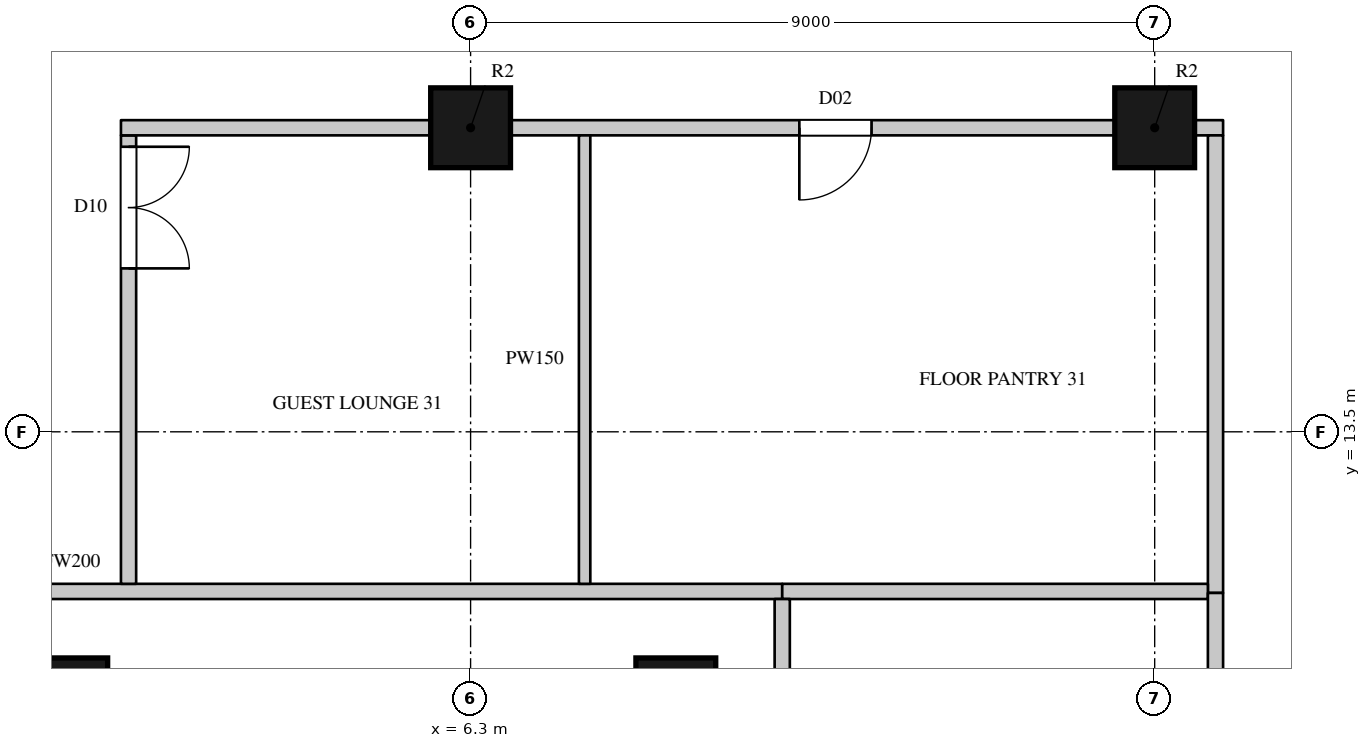
"""IFC4 building model, lengths in metres.
Left out: names, types, materials, properties, quantities, classifications, styles, units other than length and angle.
Written with IfcOpenShell. Run it as: python <this file> out.ifc"""

import sys

from ifc_helpers import new_model, si_unit, direction, frame, frame_2d, origin, origin_2d, place, context, subcontext, project, spatial, rectangle, circle, extrude, element, fill, save


model = new_model("IFC4")
c1 = context("Model", 3, precision=1e-05, world=origin(), true_north=direction((0.0, 1.0)))
c2 = subcontext(c1, "Body", "Model", "MODEL_VIEW")
j1 = project(units=[si_unit("LENGTHUNIT", "METRE"), si_unit("PLANEANGLEUNIT", "RADIAN")], contexts=[c1])
p1 = place(None, origin())
s1 = spatial("IfcSite", under=j1, at=p1, CompositionType="ELEMENT")
p2 = place(p1, origin())
s2 = spatial("IfcBuilding", under=s1, at=p2, CompositionType="ELEMENT")
p3 = place(p2, frame((0.0, 0.0, 141.9)))
s3 = spatial("IfcBuildingStorey", under=s2, at=p3, CompositionType="ELEMENT", Elevation=141.9)
for number, where, z_axis, x_axis in (
    (1, (6.3, 17.5, 0.0), (0.0, 0.0, 1.0), (1.0, 0.0, 0.0)),
    (2, (15.3, 17.5, 0.0), (0.0, 0.0, 1.0), (1.0, 0.0, 0.0)),
    (3, (1.0, 10.0, 0.0), (0.0, 0.0, 1.0), (1.0, 0.0, 0.0)),
    (4, (9.0, 10.0, 0.0), (0.0, 0.0, 1.0), (1.0, 0.0, 0.0)),
):
    element("IfcColumn", number, at=place(p3, frame(where, z_axis=z_axis, x_axis=x_axis)), inside=s3, PredefinedType="COLUMN", context=c2, shape_type="SweptSolid", body=[
        extrude(circle(Radius=0.525, at=origin_2d()), origin(), (0.0, 0.0, 1.0), 3.6),
    ])
p4 = place(p3, frame((-8.3, 11.4, 0.0), z_axis=(0.0, 0.0, 1.0), x_axis=(1.0, 0.0, 0.0)))
e5 = element("IfcWall", 5, at=p4, inside=s3, PredefinedType="PARTITIONING", context=c2, shape_type="SweptSolid", body=[
    extrude(rectangle(XDim=18.7, YDim=0.2, at=frame_2d((9.35, 0.0))), origin(), (0.0, 0.0, 1.0), 3.3),
])
p5 = place(p4, frame((6.9, 0.0, 0.0)))
e6 = element("IfcOpeningElement", 6, at=p5, cuts=e5, PredefinedType="OPENING", context=c2, shape_type="SweptSolid", body=[
    extrude(rectangle(XDim=1.5, YDim=2.2, at=frame_2d((0.75, 1.1))), frame((0.0, 0.11, 0.0), z_axis=(0.0, -1.0, 0.0), x_axis=(1.0, 0.0, 0.0)), (0.0, 0.0, 1.0), 0.22),
])
p6 = place(p3, frame((1.8, 11.5, 0.0), z_axis=(0.0, 0.0, 1.0), x_axis=(0.0, 1.0, 0.0)))
e7 = element("IfcWall", 7, at=p6, inside=s3, PredefinedType="PARTITIONING", context=c2, shape_type="SweptSolid", body=[
    extrude(rectangle(XDim=5.9, YDim=0.2, at=frame_2d((2.95, 0.0))), origin(), (0.0, 0.0, 1.0), 3.3),
])
p7 = place(p6, frame((4.15, 0.0, 0.0)))
e8 = element("IfcOpeningElement", 8, at=p7, cuts=e7, PredefinedType="OPENING", context=c2, shape_type="SweptSolid", body=[
    extrude(rectangle(XDim=1.6, YDim=2.4, at=frame_2d((0.8, 1.2))), frame((0.0, 0.11, 0.0), z_axis=(0.0, -1.0, 0.0), x_axis=(1.0, 0.0, 0.0)), (0.0, 0.0, 1.0), 0.22),
])
p8 = place(p3, frame((1.7, 17.5, 0.0), z_axis=(0.0, 0.0, 1.0), x_axis=(1.0, 0.0, 0.0)))
e9 = element("IfcWall", 9, at=p8, inside=s3, PredefinedType="PARTITIONING", context=c2, shape_type="SweptSolid", body=[
    extrude(rectangle(XDim=4.075, YDim=0.2, at=frame_2d((2.038, 0.0))), origin(), (0.0, 0.0, 1.0), 2.75),
])
p9 = place(p3, frame((6.825, 17.5, 0.0), z_axis=(0.0, 0.0, 1.0), x_axis=(1.0, 0.0, 0.0)))
e10 = element("IfcWall", 10, at=p9, inside=s3, PredefinedType="PARTITIONING", context=c2, shape_type="SweptSolid", body=[
    extrude(rectangle(XDim=7.95, YDim=0.2, at=frame_2d((3.975, 0.0))), origin(), (0.0, 0.0, 1.0), 2.75),
])
p10 = place(p9, frame((3.8, 0.0, 0.0)))
e11 = element("IfcOpeningElement", 11, at=p10, cuts=e10, PredefinedType="OPENING", context=c2, shape_type="SweptSolid", body=[
    extrude(rectangle(XDim=0.95, YDim=2.2, at=frame_2d((0.475, 1.1))), frame((0.0, 0.11, 0.0), z_axis=(0.0, -1.0, 0.0), x_axis=(1.0, 0.0, 0.0)), (0.0, 0.0, 1.0), 0.22),
])
p11 = place(p3, frame((15.825, 17.5, 0.0), z_axis=(0.0, 0.0, 1.0), x_axis=(1.0, 0.0, 0.0)))
e12 = element("IfcWall", 12, at=p11, inside=s3, PredefinedType="PARTITIONING", context=c2, shape_type="SweptSolid", body=[
    extrude(rectangle(XDim=0.375, YDim=0.2, at=frame_2d((0.188, 0.0))), origin(), (0.0, 0.0, 1.0), 3.3),
])
p12 = place(p3, frame((16.1, 11.38, 0.0), z_axis=(0.0, 0.0, 1.0), x_axis=(0.0, 1.0, 0.0)))
e13 = element("IfcWall", 13, at=p12, inside=s3, PredefinedType="PARTITIONING", context=c2, shape_type="SweptSolid", body=[
    extrude(rectangle(XDim=6.02, YDim=0.2, at=frame_2d((3.01, 0.0))), origin(), (0.0, 0.0, 1.0), 3.3),
])
p13 = place(p3, frame((7.8, 11.5, 0.0), z_axis=(0.0, 0.0, 1.0), x_axis=(0.0, 1.0, 0.0)))
e14 = element("IfcWall", 14, at=p13, inside=s3, PredefinedType="PARTITIONING", context=c2, shape_type="SweptSolid", body=[
    extrude(rectangle(XDim=5.9, YDim=0.15, at=frame_2d((2.95, 0.0))), origin(), (0.0, 0.0, 1.0), 3.3),
])
p14 = place(p3, frame((10.4, 11.4, 0.0), z_axis=(0.0, 0.0, 1.0), x_axis=(1.0, 0.0, 0.0)))
e15 = element("IfcWall", 15, at=p14, inside=s3, PredefinedType="PARTITIONING", context=c2, shape_type="SweptSolid", body=[
    extrude(rectangle(XDim=5.6, YDim=0.2, at=frame_2d((2.8, 0.0))), origin(), (0.0, 0.0, 1.0), 3.3),
])
for number, where, z_axis, x_axis in (
    (16, (10.4, 6.745, 0.0), (0.0, 0.0, 1.0), (0.0, 1.0, 0.0)),
    (17, (16.1, 6.825, 0.0), (0.0, 0.0, 1.0), (0.0, 1.0, 0.0)),
):
    element("IfcWall", number, at=place(p3, frame(where, z_axis=z_axis, x_axis=x_axis)), inside=s3, PredefinedType="PARTITIONING", context=c2, shape_type="SweptSolid", body=[
        extrude(rectangle(XDim=4.555, YDim=0.2, at=frame_2d((2.277, 0.0))), origin(), (0.0, 0.0, 1.0), 3.3),
    ])
p15 = place(p7, origin())
e18 = element("IfcDoor", 18, at=p15, inside=s3, OperationType="DOUBLE_DOOR_SINGLE_SWING", PredefinedType="DOOR", context=c2, shape_type="SweptSolid", body=[
    extrude(rectangle(XDim=1.6, YDim=2.4, at=frame_2d((0.8, 1.2))), frame((0.0, 0.025, 0.0), z_axis=(0.0, -1.0, 0.0), x_axis=(1.0, 0.0, 0.0)), (0.0, 0.0, 1.0), 0.05),
])
fill(e8, e18)
p16 = place(p10, origin())
e19 = element("IfcDoor", 19, at=p16, inside=s3, OperationType="SINGLE_SWING_RIGHT", PredefinedType="DOOR", context=c2, shape_type="SweptSolid", body=[
    extrude(rectangle(XDim=0.95, YDim=2.2, at=frame_2d((0.475, 1.1))), frame((0.0, 0.025, 0.0), z_axis=(0.0, -1.0, 0.0), x_axis=(1.0, 0.0, 0.0)), (0.0, 0.0, 1.0), 0.05),
])
fill(e11, e19)
save(model, sys.argv[1])
